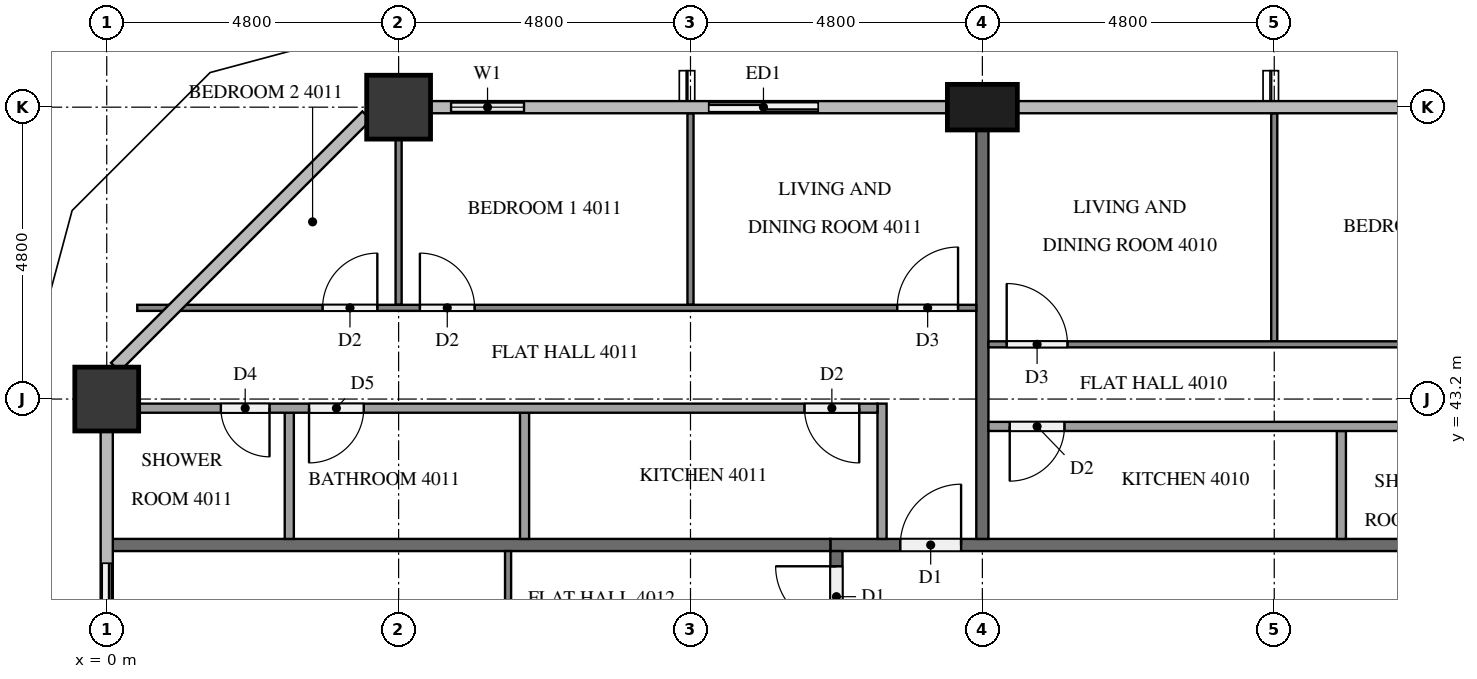
"""IFC4 building model, lengths in metres.
Left out: names, types, materials, properties, quantities, classifications, styles, units other than length and angle.
Written with IfcOpenShell. Run it as: python <this file> out.ifc"""

import sys

from ifc_helpers import new_model, si_unit, direction, frame, frame_2d, origin, origin_2d, place, context, subcontext, project, spatial, rectangle, extrude, element, fill, save


model = new_model("IFC4")
c1 = context("Model", 3, precision=1e-05, world=origin(), true_north=direction((0.0, 1.0)))
c2 = subcontext(c1, "Body", "Model", "MODEL_VIEW")
j1 = project(units=[si_unit("LENGTHUNIT", "METRE"), si_unit("PLANEANGLEUNIT", "RADIAN")], contexts=[c1])
p1 = place(None, origin())
s1 = spatial("IfcSite", under=j1, at=p1, CompositionType="ELEMENT")
p2 = place(p1, origin())
s2 = spatial("IfcBuilding", under=s1, at=p2, CompositionType="ELEMENT")
p3 = place(p2, frame((0.0, 0.0, 156.0)))
s3 = spatial("IfcBuildingStorey", under=s2, at=p3, CompositionType="ELEMENT", Elevation=156.0)
p4 = place(p3, frame((14.4, 48.0, 0.0), z_axis=(0.0, 0.0, 1.0), x_axis=(1.0, 0.0, 0.0)))
e1 = element("IfcColumn", 1, at=p4, inside=s3, PredefinedType="COLUMN", context=c2, shape_type="SweptSolid", body=[
    extrude(rectangle(XDim=1.15, YDim=0.75, at=origin_2d()), origin(), (0.0, 0.0, 1.0), 3.2),
])
for number, where, z_axis, x_axis in (
    (2, (4.8, 48.0, 0.0), (0.0, 0.0, 1.0), (1.0, 0.0, 0.0)),
    (3, (0.0, 43.2, 0.0), (0.0, 0.0, 1.0), (1.0, 0.0, 0.0)),
):
    element("IfcColumn", number, at=place(p3, frame(where, z_axis=z_axis, x_axis=x_axis)), inside=s3, PredefinedType="COLUMN", context=c2, shape_type="SweptSolid", body=[
        extrude(rectangle(XDim=1.05, YDim=1.05, at=origin_2d()), origin(), (0.0, 0.0, 1.0), 3.2),
    ])
p5 = place(p3, frame((12.0, 48.0, 0.0), z_axis=(0.0, 0.0, 1.0), x_axis=(-1.0, 0.0, 0.0)))
e4 = element("IfcWall", 4, at=p5, inside=s3, PredefinedType="SOLIDWALL", context=c2, shape_type="SweptSolid", body=[
    extrude(rectangle(XDim=2.4, YDim=0.15, at=frame_2d((1.2, 0.0))), origin(), (0.0, 0.0, 1.0), 3.2),
])
p6 = place(p5, frame((0.3, 0.0, 0.0)))
e5 = element("IfcOpeningElement", 5, at=p6, cuts=e4, PredefinedType="OPENING", context=c2, shape_type="SweptSolid", body=[
    extrude(rectangle(XDim=1.8, YDim=2.4, at=frame_2d((0.9, 1.2))), frame((0.0, 0.085, 0.0), z_axis=(0.0, -1.0, 0.0), x_axis=(1.0, 0.0, 0.0)), (0.0, 0.0, 1.0), 0.17),
])
p7 = place(p3, frame((7.2, 48.0, 0.0), z_axis=(0.0, 0.0, 1.0), x_axis=(-1.0, 0.0, 0.0)))
e6 = element("IfcWall", 6, at=p7, inside=s3, PredefinedType="SOLIDWALL", context=c2, shape_type="SweptSolid", body=[
    extrude(rectangle(XDim=1.875, YDim=0.15, at=frame_2d((0.938, 0.0))), origin(), (0.0, 0.0, 1.0), 3.2),
])
p8 = place(p7, frame((0.337, 0.0, 0.9)))
e7 = element("IfcOpeningElement", 7, at=p8, cuts=e6, PredefinedType="OPENING", context=c2, shape_type="SweptSolid", body=[
    extrude(rectangle(XDim=1.2, YDim=1.4, at=frame_2d((0.6, 0.7))), frame((0.0, 0.085, 0.0), z_axis=(0.0, -1.0, 0.0), x_axis=(1.0, 0.0, 0.0)), (0.0, 0.0, 1.0), 0.17),
])
p9 = place(p3, frame((0.0, 40.8, 0.0), z_axis=(0.0, 0.0, 1.0), x_axis=(0.0, -1.0, 0.0)))
e8 = element("IfcWall", 8, at=p9, inside=s3, PredefinedType="SOLIDWALL", context=c2, shape_type="SweptSolid", body=[
    extrude(rectangle(XDim=2.4, YDim=0.15, at=frame_2d((1.2, 0.0))), origin(), (0.0, 0.0, 1.0), 3.2),
])
p10 = place(p9, frame((0.3, 0.0, 0.0)))
e9 = element("IfcOpeningElement", 9, at=p10, cuts=e8, PredefinedType="OPENING", context=c2, shape_type="SweptSolid", body=[
    extrude(rectangle(XDim=1.8, YDim=2.4, at=frame_2d((0.9, 1.2))), frame((0.0, 0.085, 0.0), z_axis=(0.0, -1.0, 0.0), x_axis=(1.0, 0.0, 0.0)), (0.0, 0.0, 1.0), 0.17),
])
p11 = place(p3, frame((11.9, 40.8, 0.0), z_axis=(0.0, 0.0, 1.0), x_axis=(1.0, 0.0, 0.0)))
e10 = element("IfcWall", 10, at=p11, inside=s3, PredefinedType="PARTITIONING", context=c2, shape_type="SweptSolid", body=[
    extrude(rectangle(XDim=38.6, YDim=0.2, at=frame_2d((19.3, 0.0))), origin(), (0.0, 0.0, 1.0), 3.2),
])
p12 = place(p11, frame((31.65, 0.0, 0.0)))
e11 = element("IfcOpeningElement", 11, at=p12, cuts=e10, PredefinedType="OPENING", context=c2, shape_type="SweptSolid", body=[
    extrude(rectangle(XDim=1.0, YDim=2.1, at=frame_2d((0.5, 1.05))), frame((0.0, 0.11, 0.0), z_axis=(0.0, -1.0, 0.0), x_axis=(1.0, 0.0, 0.0)), (0.0, 0.0, 1.0), 0.22),
])
p13 = place(p11, frame((29.95, 0.0, 0.0)))
e12 = element("IfcOpeningElement", 12, at=p13, cuts=e10, PredefinedType="OPENING", context=c2, shape_type="SweptSolid", body=[
    extrude(rectangle(XDim=1.0, YDim=2.1, at=frame_2d((0.5, 1.05))), frame((0.0, 0.11, 0.0), z_axis=(0.0, -1.0, 0.0), x_axis=(1.0, 0.0, 0.0)), (0.0, 0.0, 1.0), 0.22),
])
p14 = place(p11, frame((15.55, 0.0, 0.0)))
e13 = element("IfcOpeningElement", 13, at=p14, cuts=e10, PredefinedType="OPENING", context=c2, shape_type="SweptSolid", body=[
    extrude(rectangle(XDim=1.0, YDim=2.1, at=frame_2d((0.5, 1.05))), frame((0.0, 0.11, 0.0), z_axis=(0.0, -1.0, 0.0), x_axis=(1.0, 0.0, 0.0)), (0.0, 0.0, 1.0), 0.22),
])
p15 = place(p11, frame((1.15, 0.0, 0.0)))
e14 = element("IfcOpeningElement", 14, at=p15, cuts=e10, PredefinedType="OPENING", context=c2, shape_type="SweptSolid", body=[
    extrude(rectangle(XDim=1.0, YDim=2.1, at=frame_2d((0.5, 1.05))), frame((0.0, 0.11, 0.0), z_axis=(0.0, -1.0, 0.0), x_axis=(1.0, 0.0, 0.0)), (0.0, 0.0, 1.0), 0.22),
])
p16 = place(p3, frame((12.0, 12.1, 0.0), z_axis=(0.0, 0.0, 1.0), x_axis=(0.0, 1.0, 0.0)))
e15 = element("IfcWall", 15, at=p16, inside=s3, PredefinedType="PARTITIONING", context=c2, shape_type="SweptSolid", body=[
    extrude(rectangle(XDim=28.6, YDim=0.2, at=frame_2d((14.3, 0.0))), origin(), (0.0, 0.0, 1.0), 3.2),
])
p17 = place(p16, frame((27.35, 0.0, 0.0)))
e16 = element("IfcOpeningElement", 16, at=p17, cuts=e15, PredefinedType="OPENING", context=c2, shape_type="SweptSolid", body=[
    extrude(rectangle(XDim=1.0, YDim=2.1, at=frame_2d((0.5, 1.05))), frame((0.0, 0.11, 0.0), z_axis=(0.0, -1.0, 0.0), x_axis=(1.0, 0.0, 0.0)), (0.0, 0.0, 1.0), 0.22),
])
p18 = place(p16, frame((20.15, 0.0, 0.0)))
e17 = element("IfcOpeningElement", 17, at=p18, cuts=e15, PredefinedType="OPENING", context=c2, shape_type="SweptSolid", body=[
    extrude(rectangle(XDim=1.0, YDim=2.1, at=frame_2d((0.5, 1.05))), frame((0.0, 0.11, 0.0), z_axis=(0.0, -1.0, 0.0), x_axis=(1.0, 0.0, 0.0)), (0.0, 0.0, 1.0), 0.22),
])
p19 = place(p16, frame((10.55, 0.0, 0.0)))
e18 = element("IfcOpeningElement", 18, at=p19, cuts=e15, PredefinedType="OPENING", context=c2, shape_type="SweptSolid", body=[
    extrude(rectangle(XDim=1.0, YDim=2.1, at=frame_2d((0.5, 1.05))), frame((0.0, 0.11, 0.0), z_axis=(0.0, -1.0, 0.0), x_axis=(1.0, 0.0, 0.0)), (0.0, 0.0, 1.0), 0.22),
])
p20 = place(p3, frame((14.4, 47.625, 0.0), z_axis=(0.0, 0.0, 1.0), x_axis=(0.0, -1.0, 0.0)))
e19 = element("IfcWall", 19, at=p20, inside=s3, PredefinedType="PARTITIONING", context=c2, shape_type="SweptSolid", body=[
    extrude(rectangle(XDim=6.725, YDim=0.2, at=frame_2d((3.363, 0.0))), origin(), (0.0, 0.0, 1.0), 3.2),
])
p21 = place(p3, frame((0.1, 40.8, 0.0), z_axis=(0.0, 0.0, 1.0), x_axis=(1.0, 0.0, 0.0)))
e20 = element("IfcWall", 20, at=p21, inside=s3, PredefinedType="PARTITIONING", context=c2, shape_type="SweptSolid", body=[
    extrude(rectangle(XDim=11.8, YDim=0.2, at=frame_2d((5.9, 0.0))), origin(), (0.0, 0.0, 1.0), 3.2),
])
p22 = place(p3, frame((19.2, 44.15, 0.0), z_axis=(0.0, 0.0, 1.0), x_axis=(0.0, 1.0, 0.0)))
e21 = element("IfcWall", 21, at=p22, inside=s3, PredefinedType="PARTITIONING", context=c2, shape_type="SweptSolid", body=[
    extrude(rectangle(XDim=3.75, YDim=0.1, at=frame_2d((1.875, 0.0))), origin(), (0.0, 0.0, 1.0), 3.2),
])
p23 = place(p3, frame((14.5, 44.1, 0.0), z_axis=(0.0, 0.0, 1.0), x_axis=(1.0, 0.0, 0.0)))
e22 = element("IfcWall", 22, at=p23, inside=s3, PredefinedType="PARTITIONING", context=c2, shape_type="SweptSolid", body=[
    extrude(rectangle(XDim=14.2, YDim=0.1, at=frame_2d((7.1, 0.0))), origin(), (0.0, 0.0, 1.0), 3.2),
])
p24 = place(p23, frame((9.85, 0.0, 0.0)))
e23 = element("IfcOpeningElement", 23, at=p24, cuts=e22, PredefinedType="OPENING", context=c2, shape_type="SweptSolid", body=[
    extrude(rectangle(XDim=0.9, YDim=2.1, at=frame_2d((0.45, 1.05))), frame((0.0, 0.06, 0.0), z_axis=(0.0, -1.0, 0.0), x_axis=(1.0, 0.0, 0.0)), (0.0, 0.0, 1.0), 0.12),
])
p25 = place(p23, frame((8.25, 0.0, 0.0)))
e24 = element("IfcOpeningElement", 24, at=p25, cuts=e22, PredefinedType="OPENING", context=c2, shape_type="SweptSolid", body=[
    extrude(rectangle(XDim=0.9, YDim=2.1, at=frame_2d((0.45, 1.05))), frame((0.0, 0.06, 0.0), z_axis=(0.0, -1.0, 0.0), x_axis=(1.0, 0.0, 0.0)), (0.0, 0.0, 1.0), 0.12),
])
p26 = place(p23, frame((0.3, 0.0, 0.0)))
e25 = element("IfcOpeningElement", 25, at=p26, cuts=e22, PredefinedType="OPENING", context=c2, shape_type="SweptSolid", body=[
    extrude(rectangle(XDim=1.0, YDim=2.1, at=frame_2d((0.5, 1.05))), frame((0.0, 0.06, 0.0), z_axis=(0.0, -1.0, 0.0), x_axis=(1.0, 0.0, 0.0)), (0.0, 0.0, 1.0), 0.12),
])
p27 = place(p3, frame((20.304, 40.9, 0.0), z_axis=(0.0, 0.0, 1.0), x_axis=(0.0, 1.0, 0.0)))
e26 = element("IfcWall", 26, at=p27, inside=s3, PredefinedType="PARTITIONING", context=c2, shape_type="SweptSolid", body=[
    extrude(rectangle(XDim=1.775, YDim=0.15, at=frame_2d((0.888, 0.0))), origin(), (0.0, 0.0, 1.0), 3.2),
])
p28 = place(p3, frame((27.075, 42.75, 0.0), z_axis=(0.0, 0.0, 1.0), x_axis=(-1.0, 0.0, 0.0)))
e27 = element("IfcWall", 27, at=p28, inside=s3, PredefinedType="PARTITIONING", context=c2, shape_type="SweptSolid", body=[
    extrude(rectangle(XDim=12.575, YDim=0.15, at=frame_2d((6.288, 0.0))), origin(), (0.0, 0.0, 1.0), 3.2),
])
p29 = place(p28, frame((2.644, 0.0, 0.0)))
e28 = element("IfcOpeningElement", 28, at=p29, cuts=e27, PredefinedType="OPENING", context=c2, shape_type="SweptSolid", body=[
    extrude(rectangle(XDim=0.9, YDim=2.1, at=frame_2d((0.45, 1.05))), frame((0.0, 0.085, 0.0), z_axis=(0.0, -1.0, 0.0), x_axis=(1.0, 0.0, 0.0)), (0.0, 0.0, 1.0), 0.17),
])
p30 = place(p28, frame((4.194, 0.0, 0.0)))
e29 = element("IfcOpeningElement", 29, at=p30, cuts=e27, PredefinedType="OPENING", context=c2, shape_type="SweptSolid", body=[
    extrude(rectangle(XDim=0.8, YDim=2.1, at=frame_2d((0.4, 1.05))), frame((0.0, 0.085, 0.0), z_axis=(0.0, -1.0, 0.0), x_axis=(1.0, 0.0, 0.0)), (0.0, 0.0, 1.0), 0.17),
])
p31 = place(p28, frame((11.325, 0.0, 0.0)))
e30 = element("IfcOpeningElement", 30, at=p31, cuts=e27, PredefinedType="OPENING", context=c2, shape_type="SweptSolid", body=[
    extrude(rectangle(XDim=0.9, YDim=2.1, at=frame_2d((0.45, 1.05))), frame((0.0, 0.085, 0.0), z_axis=(0.0, -1.0, 0.0), x_axis=(1.0, 0.0, 0.0)), (0.0, 0.0, 1.0), 0.17),
])
p32 = place(p3, frame((9.6, 44.75, 0.0), z_axis=(0.0, 0.0, 1.0), x_axis=(0.0, 1.0, 0.0)))
e31 = element("IfcWall", 31, at=p32, inside=s3, PredefinedType="PARTITIONING", context=c2, shape_type="SweptSolid", body=[
    extrude(rectangle(XDim=3.15, YDim=0.1, at=frame_2d((1.575, 0.0))), origin(), (0.0, 0.0, 1.0), 3.2),
])
p33 = place(p3, frame((4.8, 44.75, 0.0), z_axis=(0.0, 0.0, 1.0), x_axis=(0.0, 1.0, 0.0)))
e32 = element("IfcWall", 32, at=p33, inside=s3, PredefinedType="PARTITIONING", context=c2, shape_type="SweptSolid", body=[
    extrude(rectangle(XDim=2.725, YDim=0.1, at=frame_2d((1.363, 0.0))), origin(), (0.0, 0.0, 1.0), 3.2),
])
p34 = place(p3, frame((0.502, 44.7, 0.0), z_axis=(0.0, 0.0, 1.0), x_axis=(1.0, 0.0, 0.0)))
e33 = element("IfcWall", 33, at=p34, inside=s3, PredefinedType="PARTITIONING", context=c2, shape_type="SweptSolid", body=[
    extrude(rectangle(XDim=13.798, YDim=0.1, at=frame_2d((6.899, 0.0))), origin(), (0.0, 0.0, 1.0), 3.2),
])
p35 = place(p34, frame((12.498, 0.0, 0.0)))
e34 = element("IfcOpeningElement", 34, at=p35, cuts=e33, PredefinedType="OPENING", context=c2, shape_type="SweptSolid", body=[
    extrude(rectangle(XDim=1.0, YDim=2.1, at=frame_2d((0.5, 1.05))), frame((0.0, 0.06, 0.0), z_axis=(0.0, -1.0, 0.0), x_axis=(1.0, 0.0, 0.0)), (0.0, 0.0, 1.0), 0.12),
])
p36 = place(p34, frame((4.648, 0.0, 0.0)))
e35 = element("IfcOpeningElement", 35, at=p36, cuts=e33, PredefinedType="OPENING", context=c2, shape_type="SweptSolid", body=[
    extrude(rectangle(XDim=0.9, YDim=2.1, at=frame_2d((0.45, 1.05))), frame((0.0, 0.06, 0.0), z_axis=(0.0, -1.0, 0.0), x_axis=(1.0, 0.0, 0.0)), (0.0, 0.0, 1.0), 0.12),
])
p37 = place(p34, frame((3.048, 0.0, 0.0)))
e36 = element("IfcOpeningElement", 36, at=p37, cuts=e33, PredefinedType="OPENING", context=c2, shape_type="SweptSolid", body=[
    extrude(rectangle(XDim=0.9, YDim=2.1, at=frame_2d((0.45, 1.05))), frame((0.0, 0.06, 0.0), z_axis=(0.0, -1.0, 0.0), x_axis=(1.0, 0.0, 0.0)), (0.0, 0.0, 1.0), 0.12),
])
for number, where, z_axis, x_axis in (
    (37, (6.871, 40.9, 0.0), (0.0, 0.0, 1.0), (0.0, 1.0, 0.0)),
    (38, (3.002, 40.9, 0.0), (0.0, 0.0, 1.0), (0.0, 1.0, 0.0)),
):
    element("IfcWall", number, at=place(p3, frame(where, z_axis=z_axis, x_axis=x_axis)), inside=s3, PredefinedType="PARTITIONING", context=c2, shape_type="SweptSolid", body=[
        extrude(rectangle(XDim=2.075, YDim=0.15, at=frame_2d((1.038, 0.0))), origin(), (0.0, 0.0, 1.0), 3.2),
    ])
p38 = place(p3, frame((12.75, 40.9, 0.0), z_axis=(0.0, 0.0, 1.0), x_axis=(0.0, 1.0, 0.0)))
e39 = element("IfcWall", 39, at=p38, inside=s3, PredefinedType="PARTITIONING", context=c2, shape_type="SweptSolid", body=[
    extrude(rectangle(XDim=2.225, YDim=0.15, at=frame_2d((1.113, 0.0))), origin(), (0.0, 0.0, 1.0), 3.2),
])
p39 = place(p3, frame((12.675, 43.05, 0.0), z_axis=(0.0, 0.0, 1.0), x_axis=(-1.0, 0.0, 0.0)))
e40 = element("IfcWall", 40, at=p39, inside=s3, PredefinedType="PARTITIONING", context=c2, shape_type="SweptSolid", body=[
    extrude(rectangle(XDim=12.15, YDim=0.15, at=frame_2d((6.075, 0.0))), origin(), (0.0, 0.0, 1.0), 3.2),
])
p40 = place(p39, frame((0.3, 0.0, 0.0)))
e41 = element("IfcOpeningElement", 41, at=p40, cuts=e40, PredefinedType="OPENING", context=c2, shape_type="SweptSolid", body=[
    extrude(rectangle(XDim=0.9, YDim=2.1, at=frame_2d((0.45, 1.05))), frame((0.0, 0.085, 0.0), z_axis=(0.0, -1.0, 0.0), x_axis=(1.0, 0.0, 0.0)), (0.0, 0.0, 1.0), 0.17),
])
p41 = place(p39, frame((8.448, 0.0, 0.0)))
e42 = element("IfcOpeningElement", 42, at=p41, cuts=e40, PredefinedType="OPENING", context=c2, shape_type="SweptSolid", body=[
    extrude(rectangle(XDim=0.9, YDim=2.1, at=frame_2d((0.45, 1.05))), frame((0.0, 0.085, 0.0), z_axis=(0.0, -1.0, 0.0), x_axis=(1.0, 0.0, 0.0)), (0.0, 0.0, 1.0), 0.17),
])
p42 = place(p39, frame((9.998, 0.0, 0.0)))
e43 = element("IfcOpeningElement", 43, at=p42, cuts=e40, PredefinedType="OPENING", context=c2, shape_type="SweptSolid", body=[
    extrude(rectangle(XDim=0.8, YDim=2.1, at=frame_2d((0.4, 1.05))), frame((0.0, 0.085, 0.0), z_axis=(0.0, -1.0, 0.0), x_axis=(1.0, 0.0, 0.0)), (0.0, 0.0, 1.0), 0.17),
])
p43 = place(p3, frame((6.6, 33.7, 0.0), z_axis=(0.0, 0.0, 1.0), x_axis=(0.0, 1.0, 0.0)))
e44 = element("IfcWall", 44, at=p43, inside=s3, PredefinedType="PARTITIONING", context=c2, shape_type="SweptSolid", body=[
    extrude(rectangle(XDim=7.0, YDim=0.1, at=frame_2d((3.5, 0.0))), origin(), (0.0, 0.0, 1.0), 3.2),
])
p44 = place(p43, frame((0.3, 0.0, 0.0)))
e45 = element("IfcOpeningElement", 45, at=p44, cuts=e44, PredefinedType="OPENING", context=c2, shape_type="SweptSolid", body=[
    extrude(rectangle(XDim=1.0, YDim=2.1, at=frame_2d((0.5, 1.05))), frame((0.0, 0.06, 0.0), z_axis=(0.0, -1.0, 0.0), x_axis=(1.0, 0.0, 0.0)), (0.0, 0.0, 1.0), 0.12),
])
p45 = place(p6, origin())
e46 = element("IfcDoor", 46, at=p45, inside=s3, OperationType="SLIDING_TO_RIGHT", PredefinedType="DOOR", context=c2, shape_type="SweptSolid", body=[
    extrude(rectangle(XDim=1.8, YDim=2.4, at=frame_2d((0.9, 1.2))), frame((0.0, 0.025, 0.0), z_axis=(0.0, -1.0, 0.0), x_axis=(1.0, 0.0, 0.0)), (0.0, 0.0, 1.0), 0.05),
])
fill(e5, e46)
p46 = place(p8, origin())
e47 = element("IfcWindow", 47, at=p46, inside=s3, PartitioningType="SINGLE_PANEL", PredefinedType="WINDOW", context=c2, shape_type="SweptSolid", body=[
    extrude(rectangle(XDim=1.2, YDim=1.4, at=frame_2d((0.6, 0.7))), frame((0.0, 0.03, 0.0), z_axis=(0.0, -1.0, 0.0), x_axis=(1.0, 0.0, 0.0)), (0.0, 0.0, 1.0), 0.06),
])
fill(e7, e47)
p47 = place(p10, origin())
e48 = element("IfcDoor", 48, at=p47, inside=s3, OperationType="SLIDING_TO_LEFT", PredefinedType="DOOR", context=c2, shape_type="SweptSolid", body=[
    extrude(rectangle(XDim=1.8, YDim=2.4, at=frame_2d((0.9, 1.2))), frame((0.0, 0.025, 0.0), z_axis=(0.0, -1.0, 0.0), x_axis=(1.0, 0.0, 0.0)), (0.0, 0.0, 1.0), 0.05),
])
fill(e9, e48)
p48 = place(p15, origin())
e49 = element("IfcDoor", 49, at=p48, inside=s3, OperationType="SINGLE_SWING_RIGHT", PredefinedType="DOOR", context=c2, shape_type="SweptSolid", body=[
    extrude(rectangle(XDim=1.0, YDim=2.1, at=frame_2d((0.5, 1.05))), frame((0.0, 0.025, 0.0), z_axis=(0.0, -1.0, 0.0), x_axis=(1.0, 0.0, 0.0)), (0.0, 0.0, 1.0), 0.05),
])
fill(e14, e49)
p49 = place(p17, origin())
e50 = element("IfcDoor", 50, at=p49, inside=s3, OperationType="SINGLE_SWING_RIGHT", PredefinedType="DOOR", context=c2, shape_type="SweptSolid", body=[
    extrude(rectangle(XDim=1.0, YDim=2.1, at=frame_2d((0.5, 1.05))), frame((0.0, 0.025, 0.0), z_axis=(0.0, -1.0, 0.0), x_axis=(1.0, 0.0, 0.0)), (0.0, 0.0, 1.0), 0.05),
])
fill(e16, e50)
p50 = place(p26, origin())
e51 = element("IfcDoor", 51, at=p50, inside=s3, OperationType="SINGLE_SWING_LEFT", PredefinedType="DOOR", context=c2, shape_type="SweptSolid", body=[
    extrude(rectangle(XDim=1.0, YDim=2.1, at=frame_2d((0.5, 1.05))), frame((0.0, 0.025, 0.0), z_axis=(0.0, -1.0, 0.0), x_axis=(1.0, 0.0, 0.0)), (0.0, 0.0, 1.0), 0.05),
])
fill(e25, e51)
p51 = place(p31, origin())
e52 = element("IfcDoor", 52, at=p51, inside=s3, OperationType="SINGLE_SWING_RIGHT", PredefinedType="DOOR", context=c2, shape_type="SweptSolid", body=[
    extrude(rectangle(XDim=0.9, YDim=2.1, at=frame_2d((0.45, 1.05))), frame((0.0, 0.025, 0.0), z_axis=(0.0, -1.0, 0.0), x_axis=(1.0, 0.0, 0.0)), (0.0, 0.0, 1.0), 0.05),
])
fill(e30, e52)
p52 = place(p35, origin())
e53 = element("IfcDoor", 53, at=p52, inside=s3, OperationType="SINGLE_SWING_RIGHT", PredefinedType="DOOR", context=c2, shape_type="SweptSolid", body=[
    extrude(rectangle(XDim=1.0, YDim=2.1, at=frame_2d((0.5, 1.05))), frame((0.0, 0.025, 0.0), z_axis=(0.0, -1.0, 0.0), x_axis=(1.0, 0.0, 0.0)), (0.0, 0.0, 1.0), 0.05),
])
fill(e34, e53)
p53 = place(p36, origin())
e54 = element("IfcDoor", 54, at=p53, inside=s3, OperationType="SINGLE_SWING_LEFT", PredefinedType="DOOR", context=c2, shape_type="SweptSolid", body=[
    extrude(rectangle(XDim=0.9, YDim=2.1, at=frame_2d((0.45, 1.05))), frame((0.0, 0.025, 0.0), z_axis=(0.0, -1.0, 0.0), x_axis=(1.0, 0.0, 0.0)), (0.0, 0.0, 1.0), 0.05),
])
fill(e35, e54)
p54 = place(p37, origin())
e55 = element("IfcDoor", 55, at=p54, inside=s3, OperationType="SINGLE_SWING_RIGHT", PredefinedType="DOOR", context=c2, shape_type="SweptSolid", body=[
    extrude(rectangle(XDim=0.9, YDim=2.1, at=frame_2d((0.45, 1.05))), frame((0.0, 0.025, 0.0), z_axis=(0.0, -1.0, 0.0), x_axis=(1.0, 0.0, 0.0)), (0.0, 0.0, 1.0), 0.05),
])
fill(e36, e55)
p55 = place(p40, origin())
e56 = element("IfcDoor", 56, at=p55, inside=s3, OperationType="SINGLE_SWING_LEFT", PredefinedType="DOOR", context=c2, shape_type="SweptSolid", body=[
    extrude(rectangle(XDim=0.9, YDim=2.1, at=frame_2d((0.45, 1.05))), frame((0.0, 0.025, 0.0), z_axis=(0.0, -1.0, 0.0), x_axis=(1.0, 0.0, 0.0)), (0.0, 0.0, 1.0), 0.05),
])
fill(e41, e56)
p56 = place(p41, origin())
e57 = element("IfcDoor", 57, at=p56, inside=s3, OperationType="SINGLE_SWING_RIGHT", PredefinedType="DOOR", context=c2, shape_type="SweptSolid", body=[
    extrude(rectangle(XDim=0.9, YDim=2.1, at=frame_2d((0.45, 1.05))), frame((0.0, 0.025, 0.0), z_axis=(0.0, -1.0, 0.0), x_axis=(1.0, 0.0, 0.0)), (0.0, 0.0, 1.0), 0.05),
])
fill(e42, e57)
p57 = place(p42, origin())
e58 = element("IfcDoor", 58, at=p57, inside=s3, OperationType="SINGLE_SWING_LEFT", PredefinedType="DOOR", context=c2, shape_type="SweptSolid", body=[
    extrude(rectangle(XDim=0.8, YDim=2.1, at=frame_2d((0.4, 1.05))), frame((0.0, 0.025, 0.0), z_axis=(0.0, -1.0, 0.0), x_axis=(1.0, 0.0, 0.0)), (0.0, 0.0, 1.0), 0.05),
])
fill(e43, e58)
save(model, sys.argv[1])
